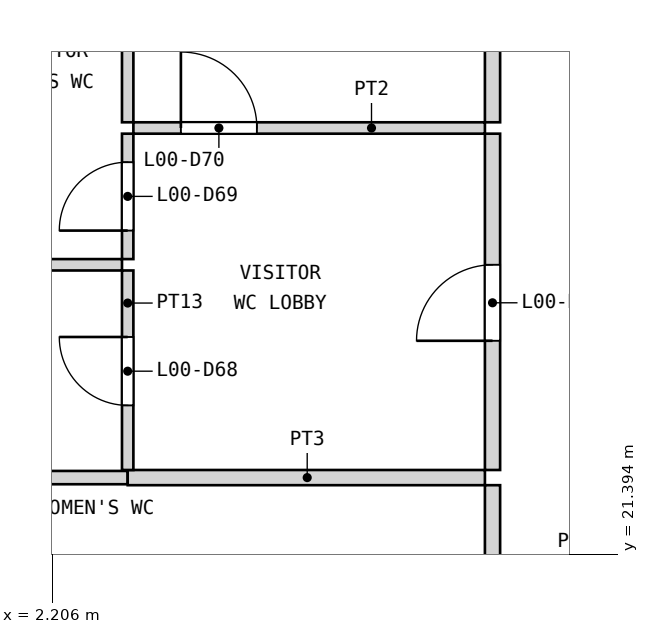
"""IFC4 building model, lengths in metres.
Left out: names, types, materials, properties, quantities, classifications, styles, units other than length and angle.
Written with IfcOpenShell. Run it as: python <this file> out.ifc"""

import sys

from ifc_helpers import new_model, si_unit, direction, frame, frame_2d, origin, place, context, subcontext, project, spatial, rectangle, extrude, element, fill, save


model = new_model("IFC4")
c1 = context("Model", 3, precision=1e-05, world=origin(), true_north=direction((0.0, 1.0)))
c2 = subcontext(c1, "Body", "Model", "MODEL_VIEW")
j1 = project(units=[si_unit("LENGTHUNIT", "METRE"), si_unit("PLANEANGLEUNIT", "RADIAN")], contexts=[c1])
p1 = place(None, origin())
s1 = spatial("IfcSite", under=j1, at=p1, CompositionType="ELEMENT")
p2 = place(p1, origin())
s2 = spatial("IfcBuilding", under=s1, at=p2, CompositionType="ELEMENT")
p3 = place(p2, origin())
s3 = spatial("IfcBuildingStorey", under=s2, at=p3, CompositionType="ELEMENT", Elevation=0.0)
p4 = place(p3, frame((0.15, 22.4, 0.0), z_axis=(0.0, 0.0, 1.0), x_axis=(1.0, 0.0, 0.0)))
e1 = element("IfcWall", 1, at=p4, inside=s3, PredefinedType="PARTITIONING", context=c2, shape_type="SweptSolid", body=[
    extrude(rectangle(XDim=3.05, YDim=0.175, at=frame_2d((1.525, 0.0))), origin(), (0.0, 0.0, 1.0), 3.9),
])
p5 = place(p3, frame((3.2, 22.4, 0.0), z_axis=(0.0, 0.0, 1.0), x_axis=(1.0, 0.0, 0.0)))
e2 = element("IfcWall", 2, at=p5, inside=s3, PredefinedType="PARTITIONING", context=c2, shape_type="SweptSolid", body=[
    extrude(rectangle(XDim=4.7, YDim=0.2, at=frame_2d((2.35, 0.0))), origin(), (0.0, 0.0, 1.0), 3.9),
])
p6 = place(p3, frame((0.15, 25.2, 0.0), z_axis=(0.0, 0.0, 1.0), x_axis=(1.0, 0.0, 0.0)))
e3 = element("IfcWall", 3, at=p6, inside=s3, PredefinedType="PARTITIONING", context=c2, shape_type="SweptSolid", body=[
    extrude(rectangle(XDim=2.975, YDim=0.15, at=frame_2d((1.488, 0.0))), origin(), (0.0, 0.0, 1.0), 3.9),
])
p7 = place(p3, frame((3.275, 27.0, 0.0), z_axis=(0.0, 0.0, 1.0), x_axis=(1.0, 0.0, 0.0)))
e4 = element("IfcWall", 4, at=p7, inside=s3, PredefinedType="PARTITIONING", context=c2, shape_type="SweptSolid", body=[
    extrude(rectangle(XDim=4.625, YDim=0.15, at=frame_2d((2.312, 0.0))), origin(), (0.0, 0.0, 1.0), 3.9),
])
p8 = place(p7, frame((0.625, 0.0, 0.0)))
e5 = element("IfcOpeningElement", 5, at=p8, cuts=e4, PredefinedType="OPENING", context=c2, shape_type="SweptSolid", body=[
    extrude(rectangle(XDim=1.0, YDim=2.1, at=frame_2d((0.5, 1.05))), frame((0.0, 0.085, 0.0), z_axis=(0.0, -1.0, 0.0), x_axis=(1.0, 0.0, 0.0)), (0.0, 0.0, 1.0), 0.17),
])
p9 = place(p3, frame((3.2, 22.5, 0.0), z_axis=(0.0, 0.0, 1.0), x_axis=(0.0, 1.0, 0.0)))
e6 = element("IfcWall", 6, at=p9, inside=s3, PredefinedType="PARTITIONING", context=c2, shape_type="SweptSolid", body=[
    extrude(rectangle(XDim=2.625, YDim=0.15, at=frame_2d((1.312, 0.0))), origin(), (0.0, 0.0, 1.0), 3.0),
])
p10 = place(p9, frame((0.85, 0.0, 0.0)))
e7 = element("IfcOpeningElement", 7, at=p10, cuts=e6, PredefinedType="OPENING", context=c2, shape_type="SweptSolid", body=[
    extrude(rectangle(XDim=0.9, YDim=2.1, at=frame_2d((0.45, 1.05))), frame((0.0, 0.085, 0.0), z_axis=(0.0, -1.0, 0.0), x_axis=(1.0, 0.0, 0.0)), (0.0, 0.0, 1.0), 0.17),
])
p11 = place(p3, frame((3.2, 25.275, 0.0), z_axis=(0.0, 0.0, 1.0), x_axis=(0.0, 1.0, 0.0)))
e8 = element("IfcWall", 8, at=p11, inside=s3, PredefinedType="PARTITIONING", context=c2, shape_type="SweptSolid", body=[
    extrude(rectangle(XDim=1.65, YDim=0.15, at=frame_2d((0.825, 0.0))), origin(), (0.0, 0.0, 1.0), 3.0),
])
p12 = place(p11, frame((0.375, 0.0, 0.0)))
e9 = element("IfcOpeningElement", 9, at=p12, cuts=e8, PredefinedType="OPENING", context=c2, shape_type="SweptSolid", body=[
    extrude(rectangle(XDim=0.9, YDim=2.1, at=frame_2d((0.45, 1.05))), frame((0.0, 0.085, 0.0), z_axis=(0.0, -1.0, 0.0), x_axis=(1.0, 0.0, 0.0)), (0.0, 0.0, 1.0), 0.17),
])
p13 = place(p3, frame((3.2, 27.075, 0.0), z_axis=(0.0, 0.0, 1.0), x_axis=(0.0, 1.0, 0.0)))
e10 = element("IfcWall", 10, at=p13, inside=s3, PredefinedType="PARTITIONING", context=c2, shape_type="SweptSolid", body=[
    extrude(rectangle(XDim=1.625, YDim=0.15, at=frame_2d((0.812, 0.0))), origin(), (0.0, 0.0, 1.0), 3.0),
])
p14 = place(p3, frame((8.0, 14.5, 0.0), z_axis=(0.0, 0.0, 1.0), x_axis=(0.0, 1.0, 0.0)))
e11 = element("IfcWall", 11, at=p14, inside=s3, PredefinedType="PARTITIONING", context=c2, shape_type="SweptSolid", body=[
    extrude(rectangle(XDim=7.8, YDim=0.2, at=frame_2d((3.9, 0.0))), origin(), (0.0, 0.0, 1.0), 3.9),
])
p15 = place(p14, frame((3.4, 0.0, 0.0)))
e12 = element("IfcOpeningElement", 12, at=p15, cuts=e11, PredefinedType="OPENING", context=c2, shape_type="SweptSolid", body=[
    extrude(rectangle(XDim=1.0, YDim=2.1, at=frame_2d((0.5, 1.05))), frame((0.0, 0.11, 0.0), z_axis=(0.0, -1.0, 0.0), x_axis=(1.0, 0.0, 0.0)), (0.0, 0.0, 1.0), 0.22),
])
p16 = place(p3, frame((8.0, 22.5, 0.0), z_axis=(0.0, 0.0, 1.0), x_axis=(0.0, 1.0, 0.0)))
e13 = element("IfcWall", 13, at=p16, inside=s3, PredefinedType="PARTITIONING", context=c2, shape_type="SweptSolid", body=[
    extrude(rectangle(XDim=4.425, YDim=0.2, at=frame_2d((2.212, 0.0))), origin(), (0.0, 0.0, 1.0), 3.9),
])
p17 = place(p16, frame((1.7, 0.0, 0.0)))
e14 = element("IfcOpeningElement", 14, at=p17, cuts=e13, PredefinedType="OPENING", context=c2, shape_type="SweptSolid", body=[
    extrude(rectangle(XDim=1.0, YDim=2.1, at=frame_2d((0.5, 1.05))), frame((0.0, 0.11, 0.0), z_axis=(0.0, -1.0, 0.0), x_axis=(1.0, 0.0, 0.0)), (0.0, 0.0, 1.0), 0.22),
])
p18 = place(p3, frame((8.0, 27.075, 0.0), z_axis=(0.0, 0.0, 1.0), x_axis=(0.0, 1.0, 0.0)))
e15 = element("IfcWall", 15, at=p18, inside=s3, PredefinedType="PARTITIONING", context=c2, shape_type="SweptSolid", body=[
    extrude(rectangle(XDim=1.625, YDim=0.2, at=frame_2d((0.812, 0.0))), origin(), (0.0, 0.0, 1.0), 3.9),
])
p19 = place(p17, origin())
e16 = element("IfcDoor", 16, at=p19, inside=s3, OperationType="SINGLE_SWING_LEFT", PredefinedType="DOOR", context=c2, shape_type="SweptSolid", body=[
    extrude(rectangle(XDim=1.0, YDim=2.1, at=frame_2d((0.5, 1.05))), frame((0.0, 0.025, 0.0), z_axis=(0.0, -1.0, 0.0), x_axis=(1.0, 0.0, 0.0)), (0.0, 0.0, 1.0), 0.05),
])
fill(e14, e16)
p20 = place(p10, origin())
e17 = element("IfcDoor", 17, at=p20, inside=s3, OperationType="SINGLE_SWING_RIGHT", PredefinedType="DOOR", context=c2, shape_type="SweptSolid", body=[
    extrude(rectangle(XDim=0.9, YDim=2.1, at=frame_2d((0.45, 1.05))), frame((0.0, 0.025, 0.0), z_axis=(0.0, -1.0, 0.0), x_axis=(1.0, 0.0, 0.0)), (0.0, 0.0, 1.0), 0.05),
])
fill(e7, e17)
p21 = place(p12, origin())
e18 = element("IfcDoor", 18, at=p21, inside=s3, OperationType="SINGLE_SWING_LEFT", PredefinedType="DOOR", context=c2, shape_type="SweptSolid", body=[
    extrude(rectangle(XDim=0.9, YDim=2.1, at=frame_2d((0.45, 1.05))), frame((0.0, 0.025, 0.0), z_axis=(0.0, -1.0, 0.0), x_axis=(1.0, 0.0, 0.0)), (0.0, 0.0, 1.0), 0.05),
])
fill(e9, e18)
p22 = place(p8, origin())
e19 = element("IfcDoor", 19, at=p22, inside=s3, OperationType="SINGLE_SWING_LEFT", PredefinedType="DOOR", context=c2, shape_type="SweptSolid", body=[
    extrude(rectangle(XDim=1.0, YDim=2.1, at=frame_2d((0.5, 1.05))), frame((0.0, 0.025, 0.0), z_axis=(0.0, -1.0, 0.0), x_axis=(1.0, 0.0, 0.0)), (0.0, 0.0, 1.0), 0.05),
])
fill(e5, e19)
save(model, sys.argv[1])
